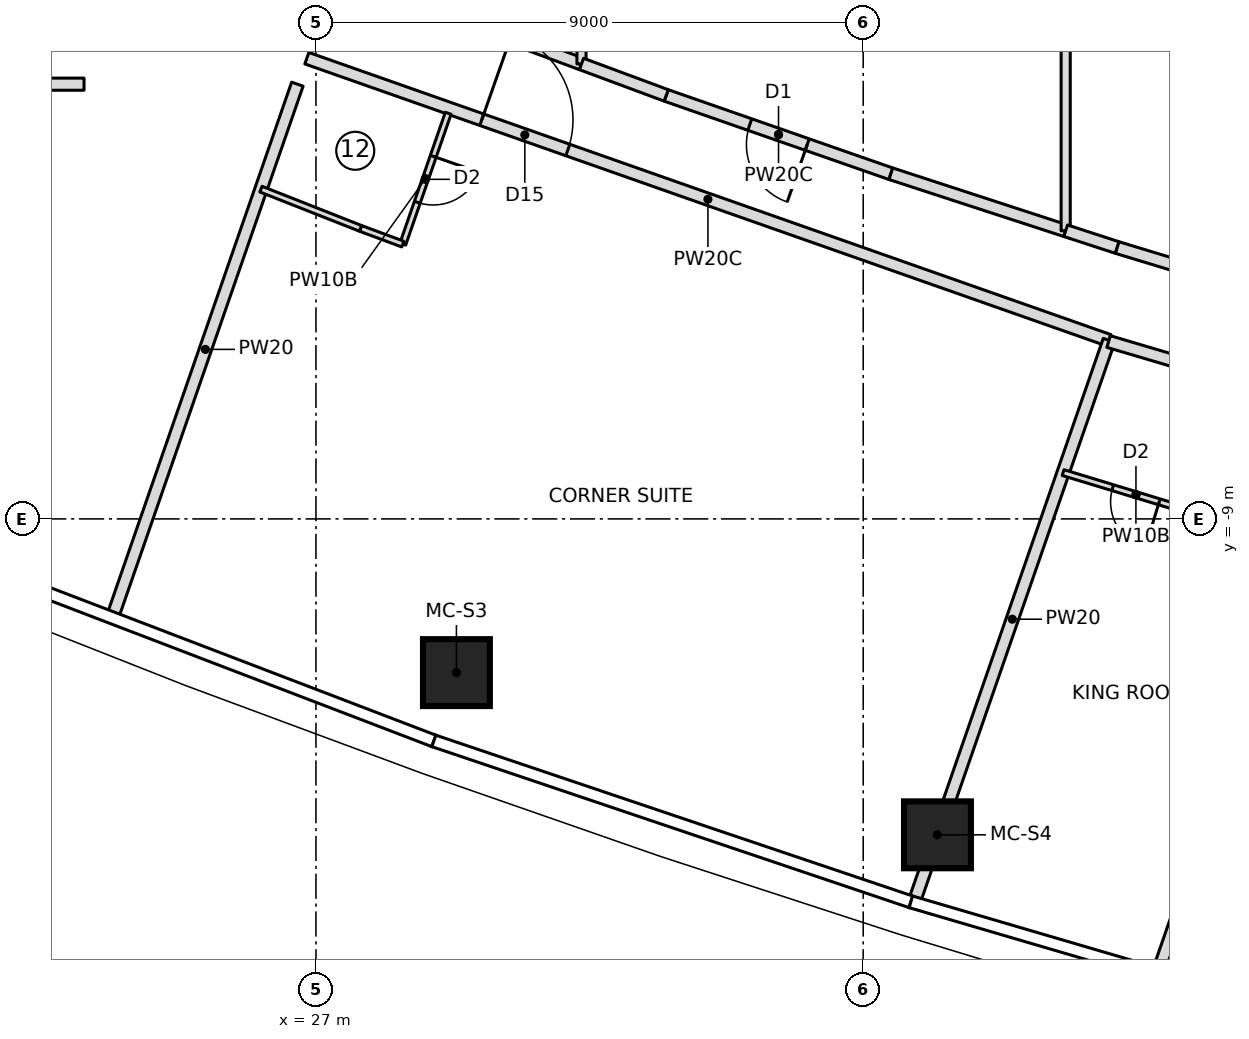
"""IFC4 building model, lengths in metres.
Left out: names, types, materials, properties, quantities, classifications, styles, units other than length and angle.
Written with IfcOpenShell. Run it as: python <this file> out.ifc"""

import sys

from ifc_helpers import new_model, si_unit, direction, frame, frame_2d, origin, origin_2d, place, context, subcontext, project, spatial, rectangle, extrude, element, fill, save


model = new_model("IFC4")
c1 = context("Model", 3, precision=1e-05, world=origin(), true_north=direction((0.0, 1.0)))
c2 = subcontext(c1, "Body", "Model", "MODEL_VIEW")
j1 = project(units=[si_unit("LENGTHUNIT", "METRE"), si_unit("PLANEANGLEUNIT", "RADIAN")], contexts=[c1])
p1 = place(None, origin())
s1 = spatial("IfcSite", under=j1, at=p1, CompositionType="ELEMENT")
p2 = place(p1, origin())
s2 = spatial("IfcBuilding", under=s1, at=p2, CompositionType="ELEMENT")
p3 = place(p2, frame((0.0, 0.0, 271.45)))
s3 = spatial("IfcBuildingStorey", under=s2, at=p3, CompositionType="ELEMENT", Elevation=271.45)
for number, where, z_axis, x_axis in (
    (1, (29.31, -11.528, 0.0), (0.0, 0.0, 1.0), (1.0, 0.0, 0.0)),
    (2, (37.221, -14.196, 0.0), (0.0, 0.0, 1.0), (1.0, 0.0, 0.0)),
):
    element("IfcColumn", number, at=place(p3, frame(where, z_axis=z_axis, x_axis=x_axis)), inside=s3, PredefinedType="COLUMN", context=c2, shape_type="SweptSolid", body=[
        extrude(rectangle(XDim=1.1, YDim=1.1, at=origin_2d()), origin(), (0.0, 0.0, 1.0), 3.55),
    ])
p4 = place(p3, frame((7.287, -1.85, 0.0), z_axis=(0.0, 0.0, 1.0), x_axis=(1.0, 0.0, 0.0)))
e3 = element("IfcWall", 3, at=p4, inside=s3, PredefinedType="PARTITIONING", context=c2, shape_type="SweptSolid", body=[
    extrude(rectangle(XDim=15.899, YDim=0.2, at=frame_2d((7.949, 0.0))), origin(), (0.0, 0.0, 1.0), 3.25),
])
p5 = place(p4, frame((7.624, 0.0, 0.0)))
e4 = element("IfcOpeningElement", 4, at=p5, cuts=e3, PredefinedType="OPENING", context=c2, shape_type="SweptSolid", body=[
    extrude(rectangle(XDim=1.0, YDim=2.1, at=frame_2d((0.5, 1.05))), frame((0.0, 0.11, 0.0), z_axis=(0.0, -1.0, 0.0), x_axis=(1.0, 0.0, 0.0)), (0.0, 0.0, 1.0), 0.22),
])
p6 = place(p3, frame((23.668, -10.573, 0.0), z_axis=(0.0, 0.0, 1.0), x_axis=(0.327714422317, 0.944776829418, 0.0)))
e5 = element("IfcWall", 5, at=p6, inside=s3, PredefinedType="PARTITIONING", context=c2, shape_type="SweptSolid", body=[
    extrude(rectangle(XDim=9.233, YDim=0.2, at=frame_2d((4.617, 0.0))), origin(), (0.0, 0.0, 1.0), 3.25),
])
p7 = place(p3, frame((26.85, -1.423, 0.0), z_axis=(0.0, 0.0, 1.0), x_axis=(0.943328585164, -0.331860182022, 0.0)))
e6 = element("IfcWall", 6, at=p7, inside=s3, PredefinedType="PARTITIONING", context=c2, shape_type="SweptSolid", body=[
    extrude(rectangle(XDim=13.984, YDim=0.2, at=frame_2d((6.992, 0.0))), origin(), (0.0, 0.0, 1.0), 3.25),
])
p8 = place(p7, frame((3.05, 0.0, 0.0)))
e7 = element("IfcOpeningElement", 7, at=p8, cuts=e6, PredefinedType="OPENING", context=c2, shape_type="SweptSolid", body=[
    extrude(rectangle(XDim=1.5, YDim=2.1, at=frame_2d((0.75, 1.05))), frame((0.0, 0.11, 0.0), z_axis=(0.0, -1.0, 0.0), x_axis=(1.0, 0.0, 0.0)), (0.0, 0.0, 1.0), 0.22),
])
p9 = place(p3, frame((29.175, -2.328, 0.0), z_axis=(0.0, 0.0, 1.0), x_axis=(-0.327718024288, -0.944775579996, 0.0)))
e8 = element("IfcWall", 8, at=p9, inside=s3, PredefinedType="PARTITIONING", context=c2, shape_type="SweptSolid", body=[
    extrude(rectangle(XDim=2.277, YDim=0.1, at=frame_2d((1.139, 0.0))), origin(), (0.0, 0.0, 1.0), 3.25),
])
p10 = place(p9, frame((0.75, 0.0, 0.0)))
e9 = element("IfcOpeningElement", 9, at=p10, cuts=e8, PredefinedType="OPENING", context=c2, shape_type="SweptSolid", body=[
    extrude(rectangle(XDim=0.8, YDim=2.1, at=frame_2d((0.4, 1.05))), frame((0.0, 0.06, 0.0), z_axis=(0.0, -1.0, 0.0), x_axis=(1.0, 0.0, 0.0)), (0.0, 0.0, 1.0), 0.12),
])
p11 = place(p3, frame((28.428, -4.48, 0.0), z_axis=(0.0, 0.0, 1.0), x_axis=(-0.937514267289, 0.347946833049, 0.0)))
e10 = element("IfcWall", 10, at=p11, inside=s3, PredefinedType="PARTITIONING", context=c2, shape_type="SweptSolid", body=[
    extrude(rectangle(XDim=0.742, YDim=0.1, at=frame_2d((0.371, 0.0))), origin(), (0.0, 0.0, 1.0), 3.25),
])
p12 = place(p3, frame((27.733, -4.222, 0.0), z_axis=(0.0, 0.0, 1.0), x_axis=(-0.930254925629, 0.366913850028, 0.0)))
e11 = element("IfcWall", 11, at=p12, inside=s3, PredefinedType="PARTITIONING", context=c2, shape_type="SweptSolid", body=[
    extrude(rectangle(XDim=1.76, YDim=0.1, at=frame_2d((0.88, 0.0))), origin(), (0.0, 0.0, 1.0), 3.25),
])
p13 = place(p3, frame((36.861, -15.235, 0.0), z_axis=(0.0, 0.0, 1.0), x_axis=(0.327710853631, 0.944778067279, 0.0)))
e12 = element("IfcWall", 12, at=p13, inside=s3, PredefinedType="PARTITIONING", context=c2, shape_type="SweptSolid", body=[
    extrude(rectangle(XDim=9.707, YDim=0.2, at=frame_2d((4.854, 0.0))), origin(), (0.0, 0.0, 1.0), 3.25),
])
p14 = place(p3, frame((40.035, -6.083, 0.0), z_axis=(0.0, 0.0, 1.0), x_axis=(0.958901312153, -0.283739799027, 0.0)))
e13 = element("IfcWall", 13, at=p14, inside=s3, PredefinedType="PARTITIONING", context=c2, shape_type="SweptSolid", body=[
    extrude(rectangle(XDim=4.174, YDim=0.2, at=frame_2d((2.087, 0.0))), origin(), (0.0, 0.0, 1.0), 3.25),
])
p15 = place(p14, frame((3.05, 0.0, 0.0)))
e14 = element("IfcOpeningElement", 14, at=p15, cuts=e13, PredefinedType="OPENING", context=c2, shape_type="SweptSolid", body=[
    extrude(rectangle(XDim=1.0, YDim=2.1, at=frame_2d((0.5, 1.05))), frame((0.0, 0.11, 0.0), z_axis=(0.0, -1.0, 0.0), x_axis=(1.0, 0.0, 0.0)), (0.0, 0.0, 1.0), 0.22),
])
p16 = place(p3, frame((41.681, -8.966, 0.0), z_axis=(0.0, 0.0, 1.0), x_axis=(-0.956723503196, 0.290998519638, 0.0)))
e15 = element("IfcWall", 15, at=p16, inside=s3, PredefinedType="PARTITIONING", context=c2, shape_type="SweptSolid", body=[
    extrude(rectangle(XDim=2.502, YDim=0.1, at=frame_2d((1.251, 0.0))), origin(), (0.0, 0.0, 1.0), 3.25),
])
p17 = place(p16, frame((0.85, 0.0, 0.0)))
e16 = element("IfcOpeningElement", 16, at=p17, cuts=e15, PredefinedType="OPENING", context=c2, shape_type="SweptSolid", body=[
    extrude(rectangle(XDim=0.8, YDim=2.1, at=frame_2d((0.4, 1.05))), frame((0.0, 0.06, 0.0), z_axis=(0.0, -1.0, 0.0), x_axis=(1.0, 0.0, 0.0)), (0.0, 0.0, 1.0), 0.12),
])
p18 = place(p3, frame((40.854, -16.447, 0.0), z_axis=(0.0, 0.0, 1.0), x_axis=(0.327714654767, 0.944776748788, 0.0)))
e17 = element("IfcWall", 17, at=p18, inside=s3, PredefinedType="PARTITIONING", context=c2, shape_type="SweptSolid", body=[
    extrude(rectangle(XDim=9.577, YDim=0.2, at=frame_2d((4.788, 0.0))), origin(), (0.0, 0.0, 1.0), 3.25),
])
p19 = place(p3, frame((31.367, -1.518, 0.0), z_axis=(0.0, 0.0, 1.0), x_axis=(-0.937481542944, 0.348034993411, 0.0)))
e18 = element("IfcWall", 18, at=p19, inside=s3, PredefinedType="PARTITIONING", context=c2, shape_type="SweptSolid", body=[
    extrude(rectangle(XDim=2.427, YDim=0.2, at=frame_2d((1.214, 0.0))), origin(), (0.0, 0.0, 1.0), 3.25),
])
p20 = place(p3, frame((31.367, -1.518, 0.0), z_axis=(0.0, 0.0, 1.0), x_axis=(0.0, 1.0, 0.0)))
e19 = element("IfcWall", 19, at=p20, inside=s3, PredefinedType="PARTITIONING", context=c2, shape_type="SweptSolid", body=[
    extrude(rectangle(XDim=3.035, YDim=0.15, at=frame_2d((1.518, 0.0))), origin(), (0.0, 0.0, 1.0), 3.25),
])
p21 = place(p3, frame((36.455, -3.323, 0.0), z_axis=(0.0, 0.0, 1.0), x_axis=(-0.944283635062, 0.329132825093, 0.0)))
e20 = element("IfcWall", 20, at=p21, inside=s3, PredefinedType="PARTITIONING", context=c2, shape_type="SweptSolid", body=[
    extrude(rectangle(XDim=3.913, YDim=0.2, at=frame_2d((1.957, 0.0))), origin(), (0.0, 0.0, 1.0), 3.25),
])
p22 = place(p21, frame((1.457, 0.0, 0.0)))
e21 = element("IfcOpeningElement", 21, at=p22, cuts=e20, PredefinedType="OPENING", context=c2, shape_type="SweptSolid", body=[
    extrude(rectangle(XDim=1.0, YDim=2.1, at=frame_2d((0.5, 1.05))), frame((0.0, 0.11, 0.0), z_axis=(0.0, -1.0, 0.0), x_axis=(1.0, 0.0, 0.0)), (0.0, 0.0, 1.0), 0.22),
])
p23 = place(p3, frame((39.33, -4.26, 0.0), z_axis=(0.0, 0.0, 1.0), x_axis=(-0.95070604111, 0.310093572003, 0.0)))
e22 = element("IfcWall", 22, at=p23, inside=s3, PredefinedType="PARTITIONING", context=c2, shape_type="SweptSolid", body=[
    extrude(rectangle(XDim=3.024, YDim=0.2, at=frame_2d((1.512, 0.0))), origin(), (0.0, 0.0, 1.0), 3.25),
])
p24 = place(p3, frame((32.76, -2.035, 0.0), z_axis=(0.0, 0.0, 1.0), x_axis=(-0.93742527201, 0.348186529604, 0.0)))
e23 = element("IfcWall", 23, at=p24, inside=s3, PredefinedType="PARTITIONING", context=c2, shape_type="SweptSolid", body=[
    extrude(rectangle(XDim=1.486, YDim=0.2, at=frame_2d((0.743, 0.0))), origin(), (0.0, 0.0, 1.0), 3.25),
])
p25 = place(p3, frame((39.33, -4.26, 0.0), z_axis=(0.0, 0.0, 1.0), x_axis=(0.0, 1.0, 0.0)))
e24 = element("IfcWall", 24, at=p25, inside=s3, PredefinedType="PARTITIONING", context=c2, shape_type="SweptSolid", body=[
    extrude(rectangle(XDim=8.521, YDim=0.15, at=frame_2d((4.26, 0.0))), origin(), (0.0, 0.0, 1.0), 3.25),
])
p26 = place(p3, frame((42.33, -5.191, 0.0), z_axis=(0.0, 0.0, 1.0), x_axis=(-0.956739496331, 0.290945933396, 0.0)))
e25 = element("IfcWall", 25, at=p26, inside=s3, PredefinedType="PARTITIONING", context=c2, shape_type="SweptSolid", body=[
    extrude(rectangle(XDim=2.252, YDim=0.2, at=frame_2d((1.126, 0.0))), origin(), (0.0, 0.0, 1.0), 3.25),
])
p27 = place(p3, frame((40.175, -4.536, 0.0), z_axis=(0.0, 0.0, 1.0), x_axis=(-0.950722800792, 0.310042184314, 0.0)))
e26 = element("IfcWall", 26, at=p27, inside=s3, PredefinedType="PARTITIONING", context=c2, shape_type="SweptSolid", body=[
    extrude(rectangle(XDim=0.889, YDim=0.2, at=frame_2d((0.444, 0.0))), origin(), (0.0, 0.0, 1.0), 3.25),
])
p28 = place(p10, origin())
e27 = element("IfcDoor", 27, at=p28, inside=s3, OperationType="SINGLE_SWING_LEFT", PredefinedType="DOOR", context=c2, shape_type="SweptSolid", body=[
    extrude(rectangle(XDim=0.8, YDim=2.1, at=frame_2d((0.4, 1.05))), frame((0.0, 0.025, 0.0), z_axis=(0.0, -1.0, 0.0), x_axis=(1.0, 0.0, 0.0)), (0.0, 0.0, 1.0), 0.05),
])
fill(e9, e27)
p29 = place(p8, origin())
e28 = element("IfcDoor", 28, at=p29, inside=s3, OperationType="DOUBLE_DOOR_SINGLE_SWING", PredefinedType="DOOR", context=c2, shape_type="SweptSolid", body=[
    extrude(rectangle(XDim=1.5, YDim=2.1, at=frame_2d((0.75, 1.05))), frame((0.0, 0.025, 0.0), z_axis=(0.0, -1.0, 0.0), x_axis=(1.0, 0.0, 0.0)), (0.0, 0.0, 1.0), 0.05),
])
fill(e7, e28)
p30 = place(p17, origin())
e29 = element("IfcDoor", 29, at=p30, inside=s3, OperationType="SINGLE_SWING_LEFT", PredefinedType="DOOR", context=c2, shape_type="SweptSolid", body=[
    extrude(rectangle(XDim=0.8, YDim=2.1, at=frame_2d((0.4, 1.05))), frame((0.0, 0.025, 0.0), z_axis=(0.0, -1.0, 0.0), x_axis=(1.0, 0.0, 0.0)), (0.0, 0.0, 1.0), 0.05),
])
fill(e16, e29)
p31 = place(p22, origin())
e30 = element("IfcDoor", 30, at=p31, inside=s3, OperationType="SINGLE_SWING_LEFT", PredefinedType="DOOR", context=c2, shape_type="SweptSolid", body=[
    extrude(rectangle(XDim=1.0, YDim=2.1, at=frame_2d((0.5, 1.05))), frame((0.0, 0.025, 0.0), z_axis=(0.0, -1.0, 0.0), x_axis=(1.0, 0.0, 0.0)), (0.0, 0.0, 1.0), 0.05),
])
fill(e21, e30)
save(model, sys.argv[1])
